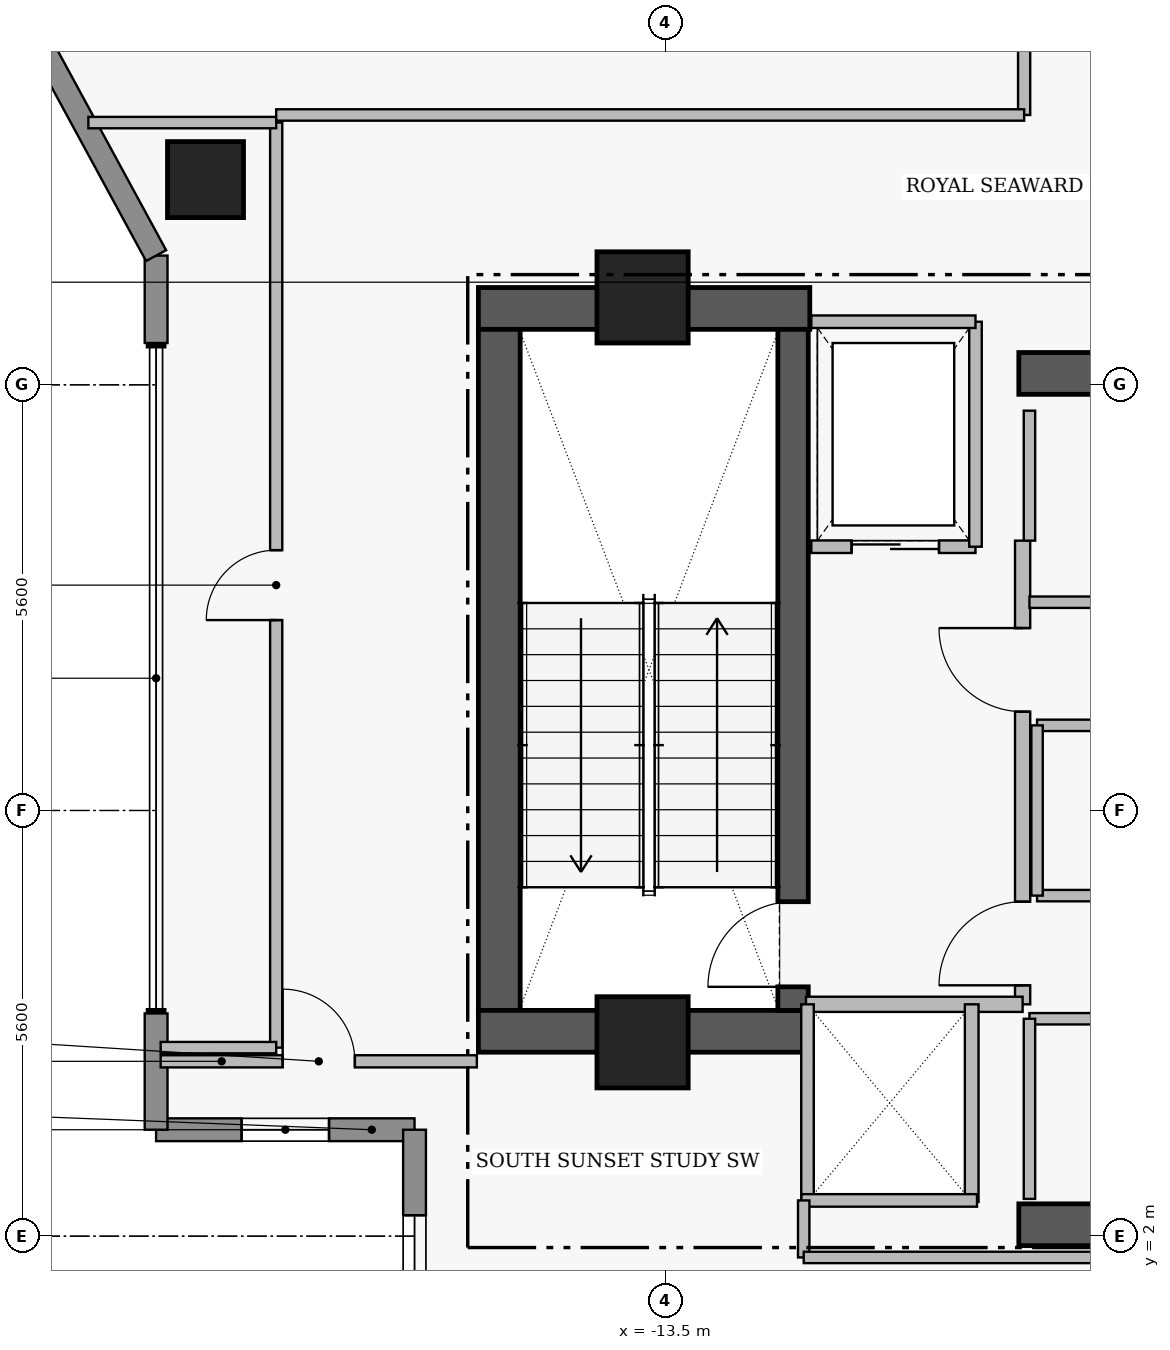
"""IFC4 building model, lengths in metres.
Left out: names, types, materials, properties, quantities, classifications, styles, units other than length and angle.
Written with IfcOpenShell. Run it as: python <this file> out.ifc"""

import sys

from ifc_helpers import new_model, si_unit, direction, frame, frame_2d, origin, origin_2d, place, context, subcontext, project, spatial, rectangle, extrude, element, fill, save


model = new_model("IFC4")
c1 = context("Model", 3, precision=1e-05, world=origin(), true_north=direction((0.0, 1.0)))
c2 = subcontext(c1, "Body", "Model", "MODEL_VIEW")
j1 = project(units=[si_unit("LENGTHUNIT", "METRE"), si_unit("PLANEANGLEUNIT", "RADIAN")], contexts=[c1])
p1 = place(None, origin())
s1 = spatial("IfcSite", under=j1, at=p1, CompositionType="ELEMENT")
p2 = place(p1, origin())
s2 = spatial("IfcBuilding", under=s1, at=p2, CompositionType="ELEMENT")
p3 = place(p2, frame((0.0, 0.0, 292.85)))
s3 = spatial("IfcBuildingStorey", under=s2, at=p3, CompositionType="ELEMENT", Elevation=292.85)
p4 = place(p3, frame((-15.96, 14.205, 0.0), z_axis=(0.0, 0.0, 1.0), x_axis=(1.0, 0.0, 0.0)))
e1 = element("IfcWall", 1, at=p4, inside=s3, PredefinedType="SHEAR", context=c2, shape_type="SweptSolid", body=[
    extrude(rectangle(XDim=4.36, YDim=0.55, at=frame_2d((2.18, 0.0))), origin(), (0.0, 0.0, 1.0), 4.21),
])
p5 = place(p3, frame((-15.685, 4.97, 0.0), z_axis=(0.0, 0.0, 1.0), x_axis=(0.0, 1.0, 0.0)))
e2 = element("IfcWall", 2, at=p5, inside=s3, PredefinedType="SHEAR", context=c2, shape_type="SweptSolid", body=[
    extrude(rectangle(XDim=8.96, YDim=0.55, at=frame_2d((4.48, 0.0))), origin(), (0.0, 0.0, 1.0), 4.21),
])
p6 = place(p3, frame((-15.96, 4.695, 0.0), z_axis=(0.0, 0.0, 1.0), x_axis=(1.0, 0.0, 0.0)))
e3 = element("IfcWall", 3, at=p6, inside=s3, PredefinedType="SHEAR", context=c2, shape_type="SweptSolid", body=[
    extrude(rectangle(XDim=4.36, YDim=0.55, at=frame_2d((2.18, 0.0))), origin(), (0.0, 0.0, 1.0), 4.21),
])
for number, where, z_axis, x_axis in (
    (4, (-8.85, 2.15, 0.0), (0.0, 0.0, 1.0), (1.0, 0.0, 0.0)),
    (5, (-8.85, 13.35, 0.0), (0.0, 0.0, 1.0), (1.0, 0.0, 0.0)),
):
    element("IfcWall", number, at=place(p3, frame(where, z_axis=z_axis, x_axis=x_axis)), inside=s3, PredefinedType="SHEAR", context=c2, shape_type="SweptSolid", body=[
        extrude(rectangle(XDim=7.6, YDim=0.55, at=frame_2d((3.8, 0.0))), origin(), (0.0, 0.0, 1.0), 4.16),
    ])
p7 = place(p3, frame((-11.82, 4.97, 0.0), z_axis=(0.0, 0.0, 1.0), x_axis=(0.0, 1.0, 0.0)))
e6 = element("IfcWall", 6, at=p7, inside=s3, PredefinedType="SHEAR", context=c2, shape_type="SweptSolid", body=[
    extrude(rectangle(XDim=8.96, YDim=0.4, at=frame_2d((4.48, 0.0))), origin(), (0.0, 0.0, 1.0), 4.21),
])
p8 = place(p7, frame((0.31, 0.0, 0.0)))
e7 = element("IfcOpeningElement", 7, at=p8, cuts=e6, PredefinedType="OPENING", context=c2, shape_type="SweptSolid", body=[
    extrude(rectangle(XDim=1.12, YDim=2.22, at=frame_2d((0.56, 1.11))), frame((0.0, 0.21, 0.0), z_axis=(0.0, -1.0, 0.0), x_axis=(1.0, 0.0, 0.0)), (0.0, 0.0, 1.0), 0.42),
])
for number, where, z_axis, x_axis in (
    (8, (-13.8, 14.35, 0.0), (0.0, 0.0, 1.0), (1.0, 0.0, 0.0)),
    (9, (-13.8, 4.55, 0.0), (0.0, 0.0, 1.0), (1.0, 0.0, 0.0)),
):
    element("IfcColumn", number, at=place(p3, frame(where, z_axis=z_axis, x_axis=x_axis)), inside=s3, PredefinedType="COLUMN", context=c2, shape_type="SweptSolid", body=[
        extrude(rectangle(XDim=1.2, YDim=1.2, at=origin_2d()), origin(), (0.0, 0.0, 1.0), 4.4),
    ])
p9 = place(p3, frame((-19.55, 15.9, 0.0), z_axis=(0.0, 0.0, 1.0), x_axis=(1.0, 0.0, 0.0)))
e10 = element("IfcColumn", 10, at=p9, inside=s3, PredefinedType="COLUMN", context=c2, shape_type="SweptSolid", body=[
    extrude(rectangle(XDim=1.0, YDim=1.0, at=origin_2d()), origin(), (0.0, 0.0, 1.0), 4.4),
])
p10 = place(p3, frame((-16.8, 3.4, 0.0), z_axis=(0.0, 0.0, 1.0), x_axis=(-1.0, 0.0, 0.0)))
e11 = element("IfcWall", 11, at=p10, inside=s3, PredefinedType="STANDARD", context=c2, shape_type="SweptSolid", body=[
    extrude(rectangle(XDim=3.4, YDim=0.3, at=frame_2d((1.7, 0.0))), origin(), (0.0, 0.0, 1.0), 4.16),
])
p11 = place(p10, frame((1.125, 0.0, 1.25)))
e12 = element("IfcOpeningElement", 12, at=p11, cuts=e11, PredefinedType="OPENING", context=c2, shape_type="SweptSolid", body=[
    extrude(rectangle(XDim=1.15, YDim=1.55, at=frame_2d((0.575, 0.775))), frame((0.0, 0.16, 0.0), z_axis=(0.0, -1.0, 0.0), x_axis=(1.0, 0.0, 0.0)), (0.0, 0.0, 1.0), 0.32),
])
p12 = place(p3, frame((-20.2, 3.4, 0.0), z_axis=(0.0, 0.0, 1.0), x_axis=(0.0, 1.0, 0.0)))
e13 = element("IfcWall", 13, at=p12, inside=s3, PredefinedType="STANDARD", context=c2, shape_type="SweptSolid", body=[
    extrude(rectangle(XDim=1.53, YDim=0.3, at=frame_2d((0.765, 0.0))), origin(), (0.0, 0.0, 1.0), 4.16),
])
p13 = place(p3, frame((-20.2, 13.75, 0.0), z_axis=(0.0, 0.0, 1.0), x_axis=(0.0, 1.0, 0.0)))
e14 = element("IfcWall", 14, at=p13, inside=s3, PredefinedType="STANDARD", context=c2, shape_type="SweptSolid", body=[
    extrude(rectangle(XDim=1.15, YDim=0.3, at=frame_2d((0.575, 0.0))), origin(), (0.0, 0.0, 1.0), 4.16),
])
p14 = place(p3, frame((-20.2, 14.9, 0.0), z_axis=(0.0, 0.0, 1.0), x_axis=(-0.477505494629, 0.878628762675, 0.0)))
e15 = element("IfcWall", 15, at=p14, inside=s3, PredefinedType="STANDARD", context=c2, shape_type="SweptSolid", body=[
    extrude(rectangle(XDim=5.236, YDim=0.3, at=frame_2d((2.618, 0.0))), origin(), (0.0, 0.0, 1.0), 4.16),
])
p15 = place(p14, frame((3.034, 0.0, 1.25)))
e16 = element("IfcOpeningElement", 16, at=p15, cuts=e15, PredefinedType="OPENING", context=c2, shape_type="SweptSolid", body=[
    extrude(rectangle(XDim=1.15, YDim=1.55, at=frame_2d((0.575, 0.775))), frame((0.0, 0.16, 0.0), z_axis=(0.0, -1.0, 0.0), x_axis=(1.0, 0.0, 0.0)), (0.0, 0.0, 1.0), 0.32),
])
p16 = place(p3, frame((-16.8, 0.0, 0.0), z_axis=(0.0, 0.0, 1.0), x_axis=(0.0, 1.0, 0.0)))
e17 = element("IfcWall", 17, at=p16, inside=s3, PredefinedType="STANDARD", context=c2, shape_type="SweptSolid", body=[
    extrude(rectangle(XDim=3.4, YDim=0.3, at=frame_2d((1.7, 0.0))), origin(), (0.0, 0.0, 1.0), 4.16),
])
p17 = place(p16, frame((1.125, 0.0, 1.25)))
e18 = element("IfcOpeningElement", 18, at=p17, cuts=e17, PredefinedType="OPENING", context=c2, shape_type="SweptSolid", body=[
    extrude(rectangle(XDim=1.15, YDim=1.55, at=frame_2d((0.575, 0.775))), frame((0.0, 0.16, 0.0), z_axis=(0.0, -1.0, 0.0), x_axis=(1.0, 0.0, 0.0)), (0.0, 0.0, 1.0), 0.32),
])
p18 = place(p3, frame((-8.8, 5.05, 0.0), z_axis=(0.0, 0.0, 1.0), x_axis=(0.0, 1.0, 0.0)))
e19 = element("IfcWall", 19, at=p18, inside=s3, PredefinedType="PARTITIONING", context=c2, shape_type="SweptSolid", body=[
    extrude(rectangle(XDim=6.1, YDim=0.2, at=frame_2d((3.05, 0.0))), origin(), (0.0, 0.0, 1.0), 4.16),
])
p19 = place(p18, frame((0.25, 0.0, 0.0)))
e20 = element("IfcOpeningElement", 20, at=p19, cuts=e19, PredefinedType="OPENING", context=c2, shape_type="SweptSolid", body=[
    extrude(rectangle(XDim=1.1, YDim=2.2, at=frame_2d((0.55, 1.1))), frame((0.0, 0.11, 0.0), z_axis=(0.0, -1.0, 0.0), x_axis=(1.0, 0.0, 0.0)), (0.0, 0.0, 1.0), 0.22),
])
p20 = place(p18, frame((3.85, 0.0, 0.0)))
e21 = element("IfcOpeningElement", 21, at=p20, cuts=e19, PredefinedType="OPENING", context=c2, shape_type="SweptSolid", body=[
    extrude(rectangle(XDim=1.1, YDim=2.2, at=frame_2d((0.55, 1.1))), frame((0.0, 0.11, 0.0), z_axis=(0.0, -1.0, 0.0), x_axis=(1.0, 0.0, 0.0)), (0.0, 0.0, 1.0), 0.22),
])
p21 = place(p3, frame((-11.58, 11.07, 0.0), z_axis=(0.0, 0.0, 1.0), x_axis=(1.0, 0.0, 0.0)))
e22 = element("IfcWall", 22, at=p21, inside=s3, PredefinedType="PARTITIONING", context=c2, shape_type="SweptSolid", body=[
    extrude(rectangle(XDim=2.16, YDim=0.165, at=frame_2d((1.08, 0.0))), origin(), (0.0, 0.0, 1.0), 4.16),
])
p22 = place(p21, frame((0.53, 0.0, 0.0)))
e23 = element("IfcOpeningElement", 23, at=p22, cuts=e22, PredefinedType="OPENING", context=c2, shape_type="SweptSolid", body=[
    extrude(rectangle(XDim=1.15, YDim=2.25, at=frame_2d((0.575, 1.125))), frame((0.0, 0.093, 0.0), z_axis=(0.0, -1.0, 0.0), x_axis=(1.0, 0.0, 0.0)), (0.0, 0.0, 1.0), 0.185),
])
p23 = place(p3, frame((-8.71, 4.86, 0.0), z_axis=(0.0, 0.0, 1.0), x_axis=(1.0, 0.0, 0.0)))
e24 = element("IfcWall", 24, at=p23, inside=s3, PredefinedType="PARTITIONING", context=c2, shape_type="SweptSolid", body=[
    extrude(rectangle(XDim=6.67, YDim=0.15, at=frame_2d((3.335, 0.0))), origin(), (0.0, 0.0, 1.0), 4.16),
])
p24 = place(p23, frame((2.885, 0.0, 0.0)))
e25 = element("IfcOpeningElement", 25, at=p24, cuts=e24, PredefinedType="OPENING", context=c2, shape_type="SweptSolid", body=[
    extrude(rectangle(XDim=0.9, YDim=2.15, at=frame_2d((0.45, 1.075))), frame((0.0, 0.085, 0.0), z_axis=(0.0, -1.0, 0.0), x_axis=(1.0, 0.0, 0.0)), (0.0, 0.0, 1.0), 0.17),
])
p25 = place(p3, frame((-8.71, 10.34, 0.0), z_axis=(0.0, 0.0, 1.0), x_axis=(1.0, 0.0, 0.0)))
e26 = element("IfcWall", 26, at=p25, inside=s3, PredefinedType="PARTITIONING", context=c2, shape_type="SweptSolid", body=[
    extrude(rectangle(XDim=7.42, YDim=0.15, at=frame_2d((3.71, 0.0))), origin(), (0.0, 0.0, 1.0), 4.16),
])
p26 = place(p25, frame((3.26, 0.0, 0.0)))
e27 = element("IfcOpeningElement", 27, at=p26, cuts=e26, PredefinedType="OPENING", context=c2, shape_type="SweptSolid", body=[
    extrude(rectangle(XDim=0.9, YDim=2.15, at=frame_2d((0.45, 1.075))), frame((0.0, 0.085, 0.0), z_axis=(0.0, -1.0, 0.0), x_axis=(1.0, 0.0, 0.0)), (0.0, 0.0, 1.0), 0.17),
])
p27 = place(p3, frame((-8.61, 6.48, 0.0), z_axis=(0.0, 0.0, 1.0), x_axis=(1.0, 0.0, 0.0)))
e28 = element("IfcWall", 28, at=p27, inside=s3, PredefinedType="PARTITIONING", context=c2, shape_type="SweptSolid", body=[
    extrude(rectangle(XDim=7.29, YDim=0.15, at=frame_2d((3.645, 0.0))), origin(), (0.0, 0.0, 1.0), 4.16),
])
p28 = place(p27, frame((3.195, 0.0, 0.0)))
e29 = element("IfcOpeningElement", 29, at=p28, cuts=e28, PredefinedType="OPENING", context=c2, shape_type="SweptSolid", body=[
    extrude(rectangle(XDim=0.9, YDim=2.15, at=frame_2d((0.45, 1.075))), frame((0.0, 0.085, 0.0), z_axis=(0.0, -1.0, 0.0), x_axis=(1.0, 0.0, 0.0)), (0.0, 0.0, 1.0), 0.17),
])
p29 = place(p3, frame((-20.14, 4.3, 0.0), z_axis=(0.0, 0.0, 1.0), x_axis=(1.0, 0.0, 0.0)))
e30 = element("IfcWall", 30, at=p29, inside=s3, PredefinedType="PARTITIONING", context=c2, shape_type="SweptSolid", body=[
    extrude(rectangle(XDim=4.16, YDim=0.16, at=frame_2d((2.08, 0.0))), origin(), (0.0, 0.0, 1.0), 4.16),
])
p30 = place(p29, frame((1.605, 0.0, 0.0)))
e31 = element("IfcOpeningElement", 31, at=p30, cuts=e30, PredefinedType="OPENING", context=c2, shape_type="SweptSolid", body=[
    extrude(rectangle(XDim=0.95, YDim=2.15, at=frame_2d((0.475, 1.075))), frame((0.0, 0.09, 0.0), z_axis=(0.0, -1.0, 0.0), x_axis=(1.0, 0.0, 0.0)), (0.0, 0.0, 1.0), 0.18),
])
p31 = place(p3, frame((-18.62, 4.48, 0.0), z_axis=(0.0, 0.0, 1.0), x_axis=(0.0, 1.0, 0.0)))
e32 = element("IfcWall", 32, at=p31, inside=s3, PredefinedType="PARTITIONING", context=c2, shape_type="SweptSolid", body=[
    extrude(rectangle(XDim=12.17, YDim=0.16, at=frame_2d((6.085, 0.0))), origin(), (0.0, 0.0, 1.0), 4.16),
])
p32 = place(p31, frame((5.625, 0.0, 0.0)))
e33 = element("IfcOpeningElement", 33, at=p32, cuts=e32, PredefinedType="OPENING", context=c2, shape_type="SweptSolid", body=[
    extrude(rectangle(XDim=0.92, YDim=2.12, at=frame_2d((0.46, 1.06))), frame((0.0, 0.09, 0.0), z_axis=(0.0, -1.0, 0.0), x_axis=(1.0, 0.0, 0.0)), (0.0, 0.0, 1.0), 0.18),
])
p33 = place(p3, frame((-8.78, 16.75, 0.0), z_axis=(0.0, 0.0, 1.0), x_axis=(0.0, 1.0, 0.0)))
e34 = element("IfcWall", 34, at=p33, inside=s3, PredefinedType="PARTITIONING", context=c2, shape_type="SweptSolid", body=[
    extrude(rectangle(XDim=6.85, YDim=0.16, at=frame_2d((3.425, 0.0))), origin(), (0.0, 0.0, 1.0), 4.16),
])
p34 = place(p33, frame((2.885, 0.0, 0.0)))
e35 = element("IfcOpeningElement", 35, at=p34, cuts=e34, PredefinedType="OPENING", context=c2, shape_type="SweptSolid", body=[
    extrude(rectangle(XDim=1.08, YDim=2.18, at=frame_2d((0.54, 1.09))), frame((0.0, 0.09, 0.0), z_axis=(0.0, -1.0, 0.0), x_axis=(1.0, 0.0, 0.0)), (0.0, 0.0, 1.0), 0.18),
])
p35 = place(p3, frame((-11.65, 5.05, 0.0), z_axis=(0.0, 0.0, 1.0), x_axis=(1.0, 0.0, 0.0)))
e36 = element("IfcWall", 36, at=p35, inside=s3, PredefinedType="PARTITIONING", context=c2, shape_type="SweptSolid", body=[
    extrude(rectangle(XDim=2.85, YDim=0.2, at=frame_2d((1.425, 0.0))), origin(), (0.0, 0.0, 1.0), 4.16),
])
p36 = place(p3, frame((-9.42, 11.07, 0.0), z_axis=(0.0, 0.0, 1.0), x_axis=(0.0, 1.0, 0.0)))
e37 = element("IfcWall", 37, at=p36, inside=s3, PredefinedType="PARTITIONING", context=c2, shape_type="SweptSolid", body=[
    extrude(rectangle(XDim=2.96, YDim=0.165, at=frame_2d((1.48, 0.0))), origin(), (0.0, 0.0, 1.0), 4.16),
])
p37 = place(p3, frame((-11.58, 14.03, 0.0), z_axis=(0.0, 0.0, 1.0), x_axis=(1.0, 0.0, 0.0)))
e38 = element("IfcWall", 38, at=p37, inside=s3, PredefinedType="PARTITIONING", context=c2, shape_type="SweptSolid", body=[
    extrude(rectangle(XDim=2.16, YDim=0.165, at=frame_2d((1.08, 0.0))), origin(), (0.0, 0.0, 1.0), 4.16),
])
p38 = place(p3, frame((-8.71, 2.49, 0.0), z_axis=(0.0, 0.0, 1.0), x_axis=(0.0, 1.0, 0.0)))
e39 = element("IfcWall", 39, at=p38, inside=s3, PredefinedType="PARTITIONING", context=c2, shape_type="SweptSolid", body=[
    extrude(rectangle(XDim=2.37, YDim=0.15, at=frame_2d((1.185, 0.0))), origin(), (0.0, 0.0, 1.0), 4.16),
])
p39 = place(p3, frame((-8.71, 11.15, 0.0), z_axis=(0.0, 0.0, 1.0), x_axis=(0.0, 1.0, 0.0)))
e40 = element("IfcWall", 40, at=p39, inside=s3, PredefinedType="PARTITIONING", context=c2, shape_type="SweptSolid", body=[
    extrude(rectangle(XDim=1.71, YDim=0.15, at=frame_2d((0.855, 0.0))), origin(), (0.0, 0.0, 1.0), 4.16),
])
p40 = place(p3, frame((-9.47, 2.45, 0.0), z_axis=(0.0, 0.0, 1.0), x_axis=(0.0, 1.0, 0.0)))
e41 = element("IfcWall", 41, at=p40, inside=s3, PredefinedType="PARTITIONING", context=c2, shape_type="SweptSolid", body=[
    extrude(rectangle(XDim=2.6, YDim=0.18, at=frame_2d((1.3, 0.0))), origin(), (0.0, 0.0, 1.0), 4.16),
])
p41 = place(p3, frame((-11.63, 2.47, 0.0), z_axis=(0.0, 0.0, 1.0), x_axis=(0.0, 1.0, 0.0)))
e42 = element("IfcWall", 42, at=p41, inside=s3, PredefinedType="PARTITIONING", context=c2, shape_type="SweptSolid", body=[
    extrude(rectangle(XDim=2.58, YDim=0.165, at=frame_2d((1.29, 0.0))), origin(), (0.0, 0.0, 1.0), 4.16),
])
p42 = place(p3, frame((-11.71, 2.47, 0.0), z_axis=(0.0, 0.0, 1.0), x_axis=(1.0, 0.0, 0.0)))
e43 = element("IfcWall", 43, at=p42, inside=s3, PredefinedType="PARTITIONING", context=c2, shape_type="SweptSolid", body=[
    extrude(rectangle(XDim=2.31, YDim=0.165, at=frame_2d((1.155, 0.0))), origin(), (0.0, 0.0, 1.0), 3.06),
])
p43 = place(p3, frame((-8.61, 8.72, 0.0), z_axis=(0.0, 0.0, 1.0), x_axis=(1.0, 0.0, 0.0)))
e44 = element("IfcWall", 44, at=p43, inside=s3, PredefinedType="PARTITIONING", context=c2, shape_type="SweptSolid", body=[
    extrude(rectangle(XDim=7.29, YDim=0.15, at=frame_2d((3.645, 0.0))), origin(), (0.0, 0.0, 1.0), 4.16),
])
p44 = place(p3, frame((-8.61, 6.48, 0.0), z_axis=(0.0, 0.0, 1.0), x_axis=(0.0, 1.0, 0.0)))
e45 = element("IfcWall", 45, at=p44, inside=s3, PredefinedType="PARTITIONING", context=c2, shape_type="SweptSolid", body=[
    extrude(rectangle(XDim=2.24, YDim=0.15, at=frame_2d((1.12, 0.0))), origin(), (0.0, 0.0, 1.0), 4.16),
])
p45 = place(p3, frame((-11.68, 1.72, 0.0), z_axis=(0.0, 0.0, 1.0), x_axis=(0.0, 1.0, 0.0)))
e46 = element("IfcWall", 46, at=p45, inside=s3, PredefinedType="PARTITIONING", context=c2, shape_type="SweptSolid", body=[
    extrude(rectangle(XDim=0.75, YDim=0.15, at=frame_2d((0.375, 0.0))), origin(), (0.0, 0.0, 1.0), 4.16),
])
p46 = place(p3, frame((-11.68, 1.72, 0.0), z_axis=(0.0, 0.0, 1.0), x_axis=(1.0, 0.0, 0.0)))
e47 = element("IfcWall", 47, at=p46, inside=s3, PredefinedType="PARTITIONING", context=c2, shape_type="SweptSolid", body=[
    extrude(rectangle(XDim=11.68, YDim=0.15, at=frame_2d((5.84, 0.0))), origin(), (0.0, 0.0, 1.0), 3.06),
])
p47 = place(p3, frame((-20.14, 4.48, 0.0), z_axis=(0.0, 0.0, 1.0), x_axis=(1.0, 0.0, 0.0)))
e48 = element("IfcWall", 48, at=p47, inside=s3, PredefinedType="PARTITIONING", context=c2, shape_type="SweptSolid", body=[
    extrude(rectangle(XDim=1.52, YDim=0.15, at=frame_2d((0.76, 0.0))), origin(), (0.0, 0.0, 1.0), 4.16),
])
p48 = place(p3, frame((-21.091, 16.65, 0.0), z_axis=(0.0, 0.0, 1.0), x_axis=(1.0, 0.0, 0.0)))
e49 = element("IfcWall", 49, at=p48, inside=s3, PredefinedType="PARTITIONING", context=c2, shape_type="SweptSolid", body=[
    extrude(rectangle(XDim=2.471, YDim=0.15, at=frame_2d((1.235, 0.0))), origin(), (0.0, 0.0, 1.0), 4.16),
])
p49 = place(p3, frame((-18.62, 16.75, 0.0), z_axis=(0.0, 0.0, 1.0), x_axis=(1.0, 0.0, 0.0)))
e50 = element("IfcWall", 50, at=p49, inside=s3, PredefinedType="PARTITIONING", context=c2, shape_type="SweptSolid", body=[
    extrude(rectangle(XDim=9.84, YDim=0.15, at=frame_2d((4.92, 0.0))), origin(), (0.0, 0.0, 1.0), 4.16),
])
p50 = place(p11, origin())
e51 = element("IfcWindow", 51, at=p50, inside=s3, PartitioningType="SINGLE_PANEL", PredefinedType="WINDOW", context=c2, shape_type="SweptSolid", body=[
    extrude(rectangle(XDim=1.15, YDim=1.55, at=frame_2d((0.575, 0.775))), frame((0.0, 0.03, 0.0), z_axis=(0.0, -1.0, 0.0), x_axis=(1.0, 0.0, 0.0)), (0.0, 0.0, 1.0), 0.06),
])
fill(e12, e51)
p51 = place(p17, origin())
e52 = element("IfcWindow", 52, at=p51, inside=s3, PartitioningType="SINGLE_PANEL", PredefinedType="WINDOW", context=c2, shape_type="SweptSolid", body=[
    extrude(rectangle(XDim=1.15, YDim=1.55, at=frame_2d((0.575, 0.775))), frame((0.0, 0.03, 0.0), z_axis=(0.0, -1.0, 0.0), x_axis=(1.0, 0.0, 0.0)), (0.0, 0.0, 1.0), 0.06),
])
fill(e18, e52)
p52 = place(p8, origin())
e53 = element("IfcDoor", 53, at=p52, inside=s3, OperationType="SINGLE_SWING_LEFT", PredefinedType="DOOR", context=c2, shape_type="SweptSolid", body=[
    extrude(rectangle(XDim=1.12, YDim=2.22, at=frame_2d((0.56, 1.11))), frame((0.0, 0.025, 0.0), z_axis=(0.0, -1.0, 0.0), x_axis=(1.0, 0.0, 0.0)), (0.0, 0.0, 1.0), 0.05),
])
fill(e7, e53)
p53 = place(p19, origin())
e54 = element("IfcDoor", 54, at=p53, inside=s3, OperationType="SINGLE_SWING_LEFT", PredefinedType="DOOR", context=c2, shape_type="SweptSolid", body=[
    extrude(rectangle(XDim=1.1, YDim=2.2, at=frame_2d((0.55, 1.1))), frame((0.0, 0.025, 0.0), z_axis=(0.0, -1.0, 0.0), x_axis=(1.0, 0.0, 0.0)), (0.0, 0.0, 1.0), 0.05),
])
fill(e20, e54)
p54 = place(p20, origin())
e55 = element("IfcDoor", 55, at=p54, inside=s3, OperationType="SINGLE_SWING_RIGHT", PredefinedType="DOOR", context=c2, shape_type="SweptSolid", body=[
    extrude(rectangle(XDim=1.1, YDim=2.2, at=frame_2d((0.55, 1.1))), frame((0.0, 0.025, 0.0), z_axis=(0.0, -1.0, 0.0), x_axis=(1.0, 0.0, 0.0)), (0.0, 0.0, 1.0), 0.05),
])
fill(e21, e55)
p55 = place(p22, origin())
e56 = element("IfcDoor", 56, at=p55, inside=s3, OperationType="SLIDING_TO_LEFT", PredefinedType="DOOR", context=c2, shape_type="SweptSolid", body=[
    extrude(rectangle(XDim=1.15, YDim=2.25, at=frame_2d((0.575, 1.125))), frame((0.0, 0.025, 0.0), z_axis=(0.0, -1.0, 0.0), x_axis=(1.0, 0.0, 0.0)), (0.0, 0.0, 1.0), 0.05),
])
fill(e23, e56)
p56 = place(p30, origin())
e57 = element("IfcDoor", 57, at=p56, inside=s3, OperationType="SINGLE_SWING_LEFT", PredefinedType="DOOR", context=c2, shape_type="SweptSolid", body=[
    extrude(rectangle(XDim=0.95, YDim=2.15, at=frame_2d((0.475, 1.075))), frame((0.0, 0.025, 0.0), z_axis=(0.0, -1.0, 0.0), x_axis=(1.0, 0.0, 0.0)), (0.0, 0.0, 1.0), 0.05),
])
fill(e31, e57)
p57 = place(p32, origin())
e58 = element("IfcDoor", 58, at=p57, inside=s3, OperationType="SINGLE_SWING_LEFT", PredefinedType="DOOR", context=c2, shape_type="SweptSolid", body=[
    extrude(rectangle(XDim=0.92, YDim=2.12, at=frame_2d((0.46, 1.06))), frame((0.0, 0.025, 0.0), z_axis=(0.0, -1.0, 0.0), x_axis=(1.0, 0.0, 0.0)), (0.0, 0.0, 1.0), 0.05),
])
fill(e33, e58)
save(model, sys.argv[1])
